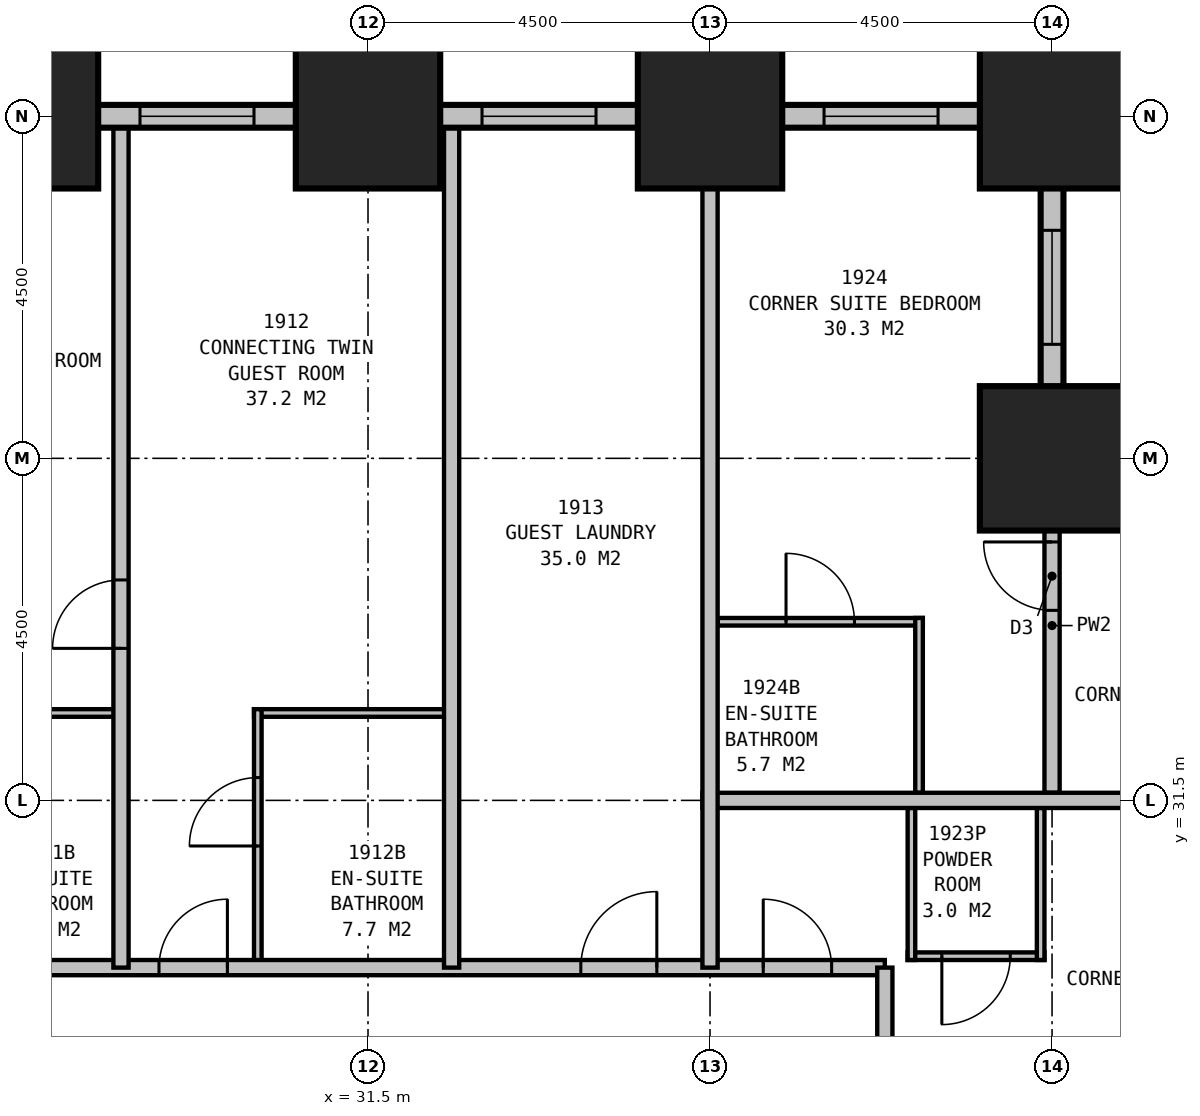
"""IFC4 building model, lengths in metres.
Left out: names, types, materials, properties, quantities, classifications, styles, units other than length and angle.
Written with IfcOpenShell. Run it as: python <this file> out.ifc"""

import sys

from ifc_helpers import new_model, si_unit, direction, frame, frame_2d, origin, origin_2d, place, context, subcontext, project, spatial, rectangle, extrude, element, fill, save


model = new_model("IFC4")
c1 = context("Model", 3, precision=1e-05, world=origin(), true_north=direction((0.0, 1.0)))
c2 = subcontext(c1, "Body", "Model", "MODEL_VIEW")
j1 = project(units=[si_unit("LENGTHUNIT", "METRE"), si_unit("PLANEANGLEUNIT", "RADIAN")], contexts=[c1])
p1 = place(None, origin())
s1 = spatial("IfcSite", under=j1, at=p1, CompositionType="ELEMENT")
p2 = place(p1, origin())
s2 = spatial("IfcBuilding", under=s1, at=p2, CompositionType="ELEMENT")
p3 = place(p2, frame((0.0, 0.0, 78.7)))
s3 = spatial("IfcBuildingStorey", under=s2, at=p3, CompositionType="ELEMENT", Elevation=78.7)
for number, where, z_axis, x_axis in (
    (1, (40.5, 36.0, 0.0), (0.0, 0.0, 1.0), (1.0, 0.0, 0.0)),
    (2, (40.5, 40.5, 0.0), (0.0, 0.0, 1.0), (1.0, 0.0, 0.0)),
    (3, (36.0, 40.5, 0.0), (0.0, 0.0, 1.0), (1.0, 0.0, 0.0)),
    (4, (31.5, 40.5, 0.0), (0.0, 0.0, 1.0), (1.0, 0.0, 0.0)),
    (5, (27.0, 40.5, 0.0), (0.0, 0.0, 1.0), (1.0, 0.0, 0.0)),
):
    element("IfcColumn", number, at=place(p3, frame(where, z_axis=z_axis, x_axis=x_axis)), inside=s3, PredefinedType="COLUMN", context=c2, shape_type="SweptSolid", body=[
        extrude(rectangle(XDim=1.9, YDim=1.9, at=origin_2d()), origin(), (0.0, 0.0, 1.0), 3.5),
    ])
p4 = place(p3, frame((45.65, 36.0, 0.0), z_axis=(0.0, 0.0, 1.0), x_axis=(-1.0, 0.0, 0.0)))
e6 = element("IfcWall", 6, at=p4, inside=s3, PredefinedType="STANDARD", context=c2, shape_type="SweptSolid", body=[
    extrude(rectangle(XDim=5.3, YDim=0.3, at=frame_2d((2.65, 0.0))), origin(), (0.0, 0.0, 1.0), 2.05),
])
p5 = place(p4, frame((1.45, 0.0, 0.5)))
e7 = element("IfcOpeningElement", 7, at=p5, cuts=e6, PredefinedType="OPENING", context=c2, shape_type="SweptSolid", body=[
    extrude(rectangle(XDim=2.4, YDim=1.4, at=frame_2d((1.2, 0.7))), frame((0.0, 0.16, 0.0), z_axis=(0.0, -1.0, 0.0), x_axis=(1.0, 0.0, 0.0)), (0.0, 0.0, 1.0), 0.32),
])
p6 = place(p3, frame((40.5, 35.85, 0.0), z_axis=(0.0, 0.0, 1.0), x_axis=(0.0, 1.0, 0.0)))
e8 = element("IfcWall", 8, at=p6, inside=s3, PredefinedType="STANDARD", context=c2, shape_type="SweptSolid", body=[
    extrude(rectangle(XDim=4.8, YDim=0.3, at=frame_2d((2.4, 0.0))), origin(), (0.0, 0.0, 1.0), 2.05),
])
p7 = place(p6, frame((1.65, 0.0, 0.5)))
e9 = element("IfcOpeningElement", 9, at=p7, cuts=e8, PredefinedType="OPENING", context=c2, shape_type="SweptSolid", body=[
    extrude(rectangle(XDim=1.5, YDim=1.4, at=frame_2d((0.75, 0.7))), frame((0.0, 0.16, 0.0), z_axis=(0.0, -1.0, 0.0), x_axis=(1.0, 0.0, 0.0)), (0.0, 0.0, 1.0), 0.32),
])
p8 = place(p3, frame((40.65, 40.5, 0.0), z_axis=(0.0, 0.0, 1.0), x_axis=(-1.0, 0.0, 0.0)))
e10 = element("IfcWall", 10, at=p8, inside=s3, PredefinedType="STANDARD", context=c2, shape_type="SweptSolid", body=[
    extrude(rectangle(XDim=31.8, YDim=0.3, at=frame_2d((15.9, 0.0))), origin(), (0.0, 0.0, 1.0), 2.05),
])
p9 = place(p8, frame((1.65, 0.0, 0.5)))
e11 = element("IfcOpeningElement", 11, at=p9, cuts=e10, PredefinedType="OPENING", context=c2, shape_type="SweptSolid", body=[
    extrude(rectangle(XDim=1.5, YDim=1.4, at=frame_2d((0.75, 0.7))), frame((0.0, 0.16, 0.0), z_axis=(0.0, -1.0, 0.0), x_axis=(1.0, 0.0, 0.0)), (0.0, 0.0, 1.0), 0.32),
])
p10 = place(p8, frame((6.15, 0.0, 0.5)))
e12 = element("IfcOpeningElement", 12, at=p10, cuts=e10, PredefinedType="OPENING", context=c2, shape_type="SweptSolid", body=[
    extrude(rectangle(XDim=1.5, YDim=1.4, at=frame_2d((0.75, 0.7))), frame((0.0, 0.16, 0.0), z_axis=(0.0, -1.0, 0.0), x_axis=(1.0, 0.0, 0.0)), (0.0, 0.0, 1.0), 0.32),
])
p11 = place(p8, frame((10.65, 0.0, 0.5)))
e13 = element("IfcOpeningElement", 13, at=p11, cuts=e10, PredefinedType="OPENING", context=c2, shape_type="SweptSolid", body=[
    extrude(rectangle(XDim=1.5, YDim=1.4, at=frame_2d((0.75, 0.7))), frame((0.0, 0.16, 0.0), z_axis=(0.0, -1.0, 0.0), x_axis=(1.0, 0.0, 0.0)), (0.0, 0.0, 1.0), 0.32),
])
p12 = place(p8, frame((15.15, 0.0, 0.5)))
e14 = element("IfcOpeningElement", 14, at=p12, cuts=e10, PredefinedType="OPENING", context=c2, shape_type="SweptSolid", body=[
    extrude(rectangle(XDim=1.5, YDim=1.4, at=frame_2d((0.75, 0.7))), frame((0.0, 0.16, 0.0), z_axis=(0.0, -1.0, 0.0), x_axis=(1.0, 0.0, 0.0)), (0.0, 0.0, 1.0), 0.32),
])
p13 = place(p8, frame((19.65, 0.0, 0.5)))
e15 = element("IfcOpeningElement", 15, at=p13, cuts=e10, PredefinedType="OPENING", context=c2, shape_type="SweptSolid", body=[
    extrude(rectangle(XDim=1.5, YDim=1.4, at=frame_2d((0.75, 0.7))), frame((0.0, 0.16, 0.0), z_axis=(0.0, -1.0, 0.0), x_axis=(1.0, 0.0, 0.0)), (0.0, 0.0, 1.0), 0.32),
])
p14 = place(p8, frame((24.15, 0.0, 0.5)))
e16 = element("IfcOpeningElement", 16, at=p14, cuts=e10, PredefinedType="OPENING", context=c2, shape_type="SweptSolid", body=[
    extrude(rectangle(XDim=1.5, YDim=1.4, at=frame_2d((0.75, 0.7))), frame((0.0, 0.16, 0.0), z_axis=(0.0, -1.0, 0.0), x_axis=(1.0, 0.0, 0.0)), (0.0, 0.0, 1.0), 0.32),
])
p15 = place(p8, frame((28.65, 0.0, 0.5)))
e17 = element("IfcOpeningElement", 17, at=p15, cuts=e10, PredefinedType="OPENING", context=c2, shape_type="SweptSolid", body=[
    extrude(rectangle(XDim=1.5, YDim=1.4, at=frame_2d((0.75, 0.7))), frame((0.0, 0.16, 0.0), z_axis=(0.0, -1.0, 0.0), x_axis=(1.0, 0.0, 0.0)), (0.0, 0.0, 1.0), 0.32),
])
p16 = place(p3, frame((11.2, 29.3, 0.0), z_axis=(0.0, 0.0, 1.0), x_axis=(1.0, 0.0, 0.0)))
e18 = element("IfcWall", 18, at=p16, inside=s3, PredefinedType="PARTITIONING", context=c2, shape_type="SweptSolid", body=[
    extrude(rectangle(XDim=27.1, YDim=0.2, at=frame_2d((13.55, 0.0))), origin(), (0.0, 0.0, 1.0), 3.25),
])
p17 = place(p16, frame((4.2, 0.0, 0.0)))
e19 = element("IfcOpeningElement", 19, at=p17, cuts=e18, PredefinedType="OPENING", context=c2, shape_type="SweptSolid", body=[
    extrude(rectangle(XDim=0.9, YDim=2.1, at=frame_2d((0.45, 1.05))), frame((0.0, 0.11, 0.0), z_axis=(0.0, -1.0, 0.0), x_axis=(1.0, 0.0, 0.0)), (0.0, 0.0, 1.0), 0.22),
])
p18 = place(p16, frame((8.7, 0.0, 0.0)))
e20 = element("IfcOpeningElement", 20, at=p18, cuts=e18, PredefinedType="OPENING", context=c2, shape_type="SweptSolid", body=[
    extrude(rectangle(XDim=0.9, YDim=2.1, at=frame_2d((0.45, 1.05))), frame((0.0, 0.11, 0.0), z_axis=(0.0, -1.0, 0.0), x_axis=(1.0, 0.0, 0.0)), (0.0, 0.0, 1.0), 0.22),
])
p19 = place(p16, frame((13.2, 0.0, 0.0)))
e21 = element("IfcOpeningElement", 21, at=p19, cuts=e18, PredefinedType="OPENING", context=c2, shape_type="SweptSolid", body=[
    extrude(rectangle(XDim=0.9, YDim=2.1, at=frame_2d((0.45, 1.05))), frame((0.0, 0.11, 0.0), z_axis=(0.0, -1.0, 0.0), x_axis=(1.0, 0.0, 0.0)), (0.0, 0.0, 1.0), 0.22),
])
p20 = place(p16, frame((17.55, 0.0, 0.0)))
e22 = element("IfcOpeningElement", 22, at=p20, cuts=e18, PredefinedType="OPENING", context=c2, shape_type="SweptSolid", body=[
    extrude(rectangle(XDim=0.9, YDim=2.1, at=frame_2d((0.45, 1.05))), frame((0.0, 0.11, 0.0), z_axis=(0.0, -1.0, 0.0), x_axis=(1.0, 0.0, 0.0)), (0.0, 0.0, 1.0), 0.22),
])
p21 = place(p16, frame((23.1, 0.0, 0.0)))
e23 = element("IfcOpeningElement", 23, at=p21, cuts=e18, PredefinedType="OPENING", context=c2, shape_type="SweptSolid", body=[
    extrude(rectangle(XDim=1.0, YDim=2.1, at=frame_2d((0.5, 1.05))), frame((0.0, 0.11, 0.0), z_axis=(0.0, -1.0, 0.0), x_axis=(1.0, 0.0, 0.0)), (0.0, 0.0, 1.0), 0.22),
])
p22 = place(p16, frame((25.5, 0.0, 0.0)))
e24 = element("IfcOpeningElement", 24, at=p22, cuts=e18, PredefinedType="OPENING", context=c2, shape_type="SweptSolid", body=[
    extrude(rectangle(XDim=0.9, YDim=2.1, at=frame_2d((0.45, 1.05))), frame((0.0, 0.11, 0.0), z_axis=(0.0, -1.0, 0.0), x_axis=(1.0, 0.0, 0.0)), (0.0, 0.0, 1.0), 0.22),
])
p23 = place(p16, frame((0.7, 0.0, 0.0)))
e25 = element("IfcOpeningElement", 25, at=p23, cuts=e18, PredefinedType="OPENING", context=c2, shape_type="SweptSolid", body=[
    extrude(rectangle(XDim=0.9, YDim=2.1, at=frame_2d((0.45, 1.05))), frame((0.0, 0.11, 0.0), z_axis=(0.0, -1.0, 0.0), x_axis=(1.0, 0.0, 0.0)), (0.0, 0.0, 1.0), 0.22),
])
p24 = place(p3, frame((38.3, 10.6, 0.0), z_axis=(0.0, 0.0, 1.0), x_axis=(0.0, 1.0, 0.0)))
e26 = element("IfcWall", 26, at=p24, inside=s3, PredefinedType="PARTITIONING", context=c2, shape_type="SweptSolid", body=[
    extrude(rectangle(XDim=18.7, YDim=0.2, at=frame_2d((9.35, 0.0))), origin(), (0.0, 0.0, 1.0), 3.25),
])
p25 = place(p24, frame((6.75, 0.0, 0.0), z_axis=(0.0, 0.0, 1.0), x_axis=(-1.0, 0.0, 0.0)))
e27 = element("IfcOpeningElement", 27, at=p25, cuts=e26, PredefinedType="OPENING", context=c2, shape_type="SweptSolid", body=[
    extrude(rectangle(XDim=0.9, YDim=2.1, at=frame_2d((0.45, 1.05))), frame((0.0, 0.11, 0.0), z_axis=(0.0, -1.0, 0.0), x_axis=(1.0, 0.0, 0.0)), (0.0, 0.0, 1.0), 0.22),
])
p26 = place(p24, frame((9.85, 0.0, 0.0), z_axis=(0.0, 0.0, 1.0), x_axis=(-1.0, 0.0, 0.0)))
e28 = element("IfcOpeningElement", 28, at=p26, cuts=e26, PredefinedType="OPENING", context=c2, shape_type="SweptSolid", body=[
    extrude(rectangle(XDim=1.0, YDim=2.1, at=frame_2d((0.5, 1.05))), frame((0.0, 0.11, 0.0), z_axis=(0.0, -1.0, 0.0), x_axis=(1.0, 0.0, 0.0)), (0.0, 0.0, 1.0), 0.22),
])
p27 = place(p24, frame((15.65, 0.0, 0.0), z_axis=(0.0, 0.0, 1.0), x_axis=(-1.0, 0.0, 0.0)))
e29 = element("IfcOpeningElement", 29, at=p27, cuts=e26, PredefinedType="OPENING", context=c2, shape_type="SweptSolid", body=[
    extrude(rectangle(XDim=1.0, YDim=2.1, at=frame_2d((0.5, 1.05))), frame((0.0, 0.11, 0.0), z_axis=(0.0, -1.0, 0.0), x_axis=(1.0, 0.0, 0.0)), (0.0, 0.0, 1.0), 0.22),
])
p28 = place(p3, frame((28.25, 29.3, 0.0), z_axis=(0.0, 0.0, 1.0), x_axis=(0.0, 1.0, 0.0)))
e30 = element("IfcWall", 30, at=p28, inside=s3, PredefinedType="PARTITIONING", context=c2, shape_type="SweptSolid", body=[
    extrude(rectangle(XDim=11.2, YDim=0.2, at=frame_2d((5.6, 0.0))), origin(), (0.0, 0.0, 1.0), 3.25),
])
p29 = place(p28, frame((4.2, 0.0, 0.0)))
e31 = element("IfcOpeningElement", 31, at=p29, cuts=e30, PredefinedType="OPENING", context=c2, shape_type="SweptSolid", body=[
    extrude(rectangle(XDim=0.9, YDim=2.1, at=frame_2d((0.45, 1.05))), frame((0.0, 0.11, 0.0), z_axis=(0.0, -1.0, 0.0), x_axis=(1.0, 0.0, 0.0)), (0.0, 0.0, 1.0), 0.22),
])
p30 = place(p3, frame((32.6, 29.3, 0.0), z_axis=(0.0, 0.0, 1.0), x_axis=(0.0, 1.0, 0.0)))
e32 = element("IfcWall", 32, at=p30, inside=s3, PredefinedType="PARTITIONING", context=c2, shape_type="SweptSolid", body=[
    extrude(rectangle(XDim=11.2, YDim=0.2, at=frame_2d((5.6, 0.0))), origin(), (0.0, 0.0, 1.0), 3.25),
])
for number, where, z_axis, x_axis in (
    (33, (25.65, 32.65, 0.0), (0.0, 0.0, 1.0), (1.0, 0.0, 0.0)),
    (34, (30.0, 32.65, 0.0), (0.0, 0.0, 1.0), (1.0, 0.0, 0.0)),
):
    element("IfcWall", number, at=place(p3, frame(where, z_axis=z_axis, x_axis=x_axis)), inside=s3, PredefinedType="PLUMBINGWALL", context=c2, shape_type="SweptSolid", body=[
        extrude(rectangle(XDim=2.6, YDim=0.1, at=frame_2d((1.3, 0.0))), origin(), (0.0, 0.0, 1.0), 3.25),
    ])
p31 = place(p3, frame((30.05, 29.3, 0.0), z_axis=(0.0, 0.0, 1.0), x_axis=(0.0, 1.0, 0.0)))
e35 = element("IfcWall", 35, at=p31, inside=s3, PredefinedType="PLUMBINGWALL", context=c2, shape_type="SweptSolid", body=[
    extrude(rectangle(XDim=3.4, YDim=0.1, at=frame_2d((1.7, 0.0))), origin(), (0.0, 0.0, 1.0), 3.25),
])
p32 = place(p31, frame((1.6, 0.0, 0.0)))
e36 = element("IfcOpeningElement", 36, at=p32, cuts=e35, PredefinedType="OPENING", context=c2, shape_type="SweptSolid", body=[
    extrude(rectangle(XDim=0.9, YDim=2.1, at=frame_2d((0.45, 1.05))), frame((0.0, 0.06, 0.0), z_axis=(0.0, -1.0, 0.0), x_axis=(1.0, 0.0, 0.0)), (0.0, 0.0, 1.0), 0.12),
])
p33 = place(p3, frame((36.0, 29.3, 0.0), z_axis=(0.0, 0.0, 1.0), x_axis=(0.0, 1.0, 0.0)))
e37 = element("IfcWall", 37, at=p33, inside=s3, PredefinedType="PARTITIONING", context=c2, shape_type="SweptSolid", body=[
    extrude(rectangle(XDim=11.2, YDim=0.2, at=frame_2d((5.6, 0.0))), origin(), (0.0, 0.0, 1.0), 2.25),
])
p34 = place(p3, frame((35.9, 31.5, 0.0), z_axis=(0.0, 0.0, 1.0), x_axis=(1.0, 0.0, 0.0)))
e38 = element("IfcWall", 38, at=p34, inside=s3, PredefinedType="PARTITIONING", context=c2, shape_type="SweptSolid", body=[
    extrude(rectangle(XDim=10.099, YDim=0.2, at=frame_2d((5.05, 0.0))), origin(), (0.0, 0.0, 1.0), 3.25),
])
p35 = place(p34, frame((8.099, 0.0, 0.0)))
e39 = element("IfcOpeningElement", 39, at=p35, cuts=e38, PredefinedType="OPENING", context=c2, shape_type="SweptSolid", body=[
    extrude(rectangle(XDim=0.9, YDim=2.1, at=frame_2d((0.45, 1.05))), frame((0.0, 0.11, 0.0), z_axis=(0.0, -1.0, 0.0), x_axis=(1.0, 0.0, 0.0)), (0.0, 0.0, 1.0), 0.22),
])
p36 = place(p3, frame((40.35, 31.4, 0.0), z_axis=(0.0, 0.0, 1.0), x_axis=(0.0, -1.0, 0.0)))
e40 = element("IfcWall", 40, at=p36, inside=s3, PredefinedType="PLUMBINGWALL", context=c2, shape_type="SweptSolid", body=[
    extrude(rectangle(XDim=2.0, YDim=0.1, at=frame_2d((1.0, 0.0))), origin(), (0.0, 0.0, 1.0), 2.25),
])
p37 = place(p3, frame((38.65, 31.4, 0.0), z_axis=(0.0, 0.0, 1.0), x_axis=(0.0, -1.0, 0.0)))
e41 = element("IfcWall", 41, at=p37, inside=s3, PredefinedType="PLUMBINGWALL", context=c2, shape_type="SweptSolid", body=[
    extrude(rectangle(XDim=2.0, YDim=0.1, at=frame_2d((1.0, 0.0))), origin(), (0.0, 0.0, 1.0), 3.25),
])
p38 = place(p3, frame((38.6, 29.45, 0.0), z_axis=(0.0, 0.0, 1.0), x_axis=(1.0, 0.0, 0.0)))
e42 = element("IfcWall", 42, at=p38, inside=s3, PredefinedType="PLUMBINGWALL", context=c2, shape_type="SweptSolid", body=[
    extrude(rectangle(XDim=1.8, YDim=0.1, at=frame_2d((0.9, 0.0))), origin(), (0.0, 0.0, 1.0), 3.25),
])
p39 = place(p38, frame((1.35, 0.0, 0.0), z_axis=(0.0, 0.0, 1.0), x_axis=(-1.0, 0.0, 0.0)))
e43 = element("IfcOpeningElement", 43, at=p39, cuts=e42, PredefinedType="OPENING", context=c2, shape_type="SweptSolid", body=[
    extrude(rectangle(XDim=0.9, YDim=2.1, at=frame_2d((0.45, 1.05))), frame((0.0, 0.06, 0.0), z_axis=(0.0, -1.0, 0.0), x_axis=(1.0, 0.0, 0.0)), (0.0, 0.0, 1.0), 0.12),
])
p40 = place(p3, frame((40.5, 31.6, 0.0), z_axis=(0.0, 0.0, 1.0), x_axis=(0.0, 1.0, 0.0)))
e44 = element("IfcWall", 44, at=p40, inside=s3, PredefinedType="PARTITIONING", context=c2, shape_type="SweptSolid", body=[
    extrude(rectangle(XDim=4.4, YDim=0.2, at=frame_2d((2.2, 0.0))), origin(), (0.0, 0.0, 1.0), 2.25),
])
p41 = place(p40, frame((2.4, 0.0, 0.0)))
e45 = element("IfcOpeningElement", 45, at=p41, cuts=e44, PredefinedType="OPENING", context=c2, shape_type="SweptSolid", body=[
    extrude(rectangle(XDim=0.9, YDim=2.1, at=frame_2d((0.45, 1.05))), frame((0.0, 0.11, 0.0), z_axis=(0.0, -1.0, 0.0), x_axis=(1.0, 0.0, 0.0)), (0.0, 0.0, 1.0), 0.22),
])
p42 = place(p3, frame((38.75, 31.6, 0.0), z_axis=(0.0, 0.0, 1.0), x_axis=(0.0, 1.0, 0.0)))
e46 = element("IfcWall", 46, at=p42, inside=s3, PredefinedType="PLUMBINGWALL", context=c2, shape_type="SweptSolid", body=[
    extrude(rectangle(XDim=2.3, YDim=0.1, at=frame_2d((1.15, 0.0))), origin(), (0.0, 0.0, 1.0), 3.25),
])
p43 = place(p3, frame((36.1, 33.85, 0.0), z_axis=(0.0, 0.0, 1.0), x_axis=(1.0, 0.0, 0.0)))
e47 = element("IfcWall", 47, at=p43, inside=s3, PredefinedType="PLUMBINGWALL", context=c2, shape_type="SweptSolid", body=[
    extrude(rectangle(XDim=2.7, YDim=0.1, at=frame_2d((1.35, 0.0))), origin(), (0.0, 0.0, 1.0), 3.25),
])
p44 = place(p43, frame((0.9, 0.0, 0.0)))
e48 = element("IfcOpeningElement", 48, at=p44, cuts=e47, PredefinedType="OPENING", context=c2, shape_type="SweptSolid", body=[
    extrude(rectangle(XDim=0.9, YDim=2.1, at=frame_2d((0.45, 1.05))), frame((0.0, 0.06, 0.0), z_axis=(0.0, -1.0, 0.0), x_axis=(1.0, 0.0, 0.0)), (0.0, 0.0, 1.0), 0.12),
])
p45 = place(p7, origin())
e49 = element("IfcWindow", 49, at=p45, inside=s3, PartitioningType="SINGLE_PANEL", PredefinedType="WINDOW", context=c2, shape_type="SweptSolid", body=[
    extrude(rectangle(XDim=1.5, YDim=1.4, at=frame_2d((0.75, 0.7))), frame((0.0, 0.03, 0.0), z_axis=(0.0, -1.0, 0.0), x_axis=(1.0, 0.0, 0.0)), (0.0, 0.0, 1.0), 0.06),
])
fill(e9, e49)
p46 = place(p9, origin())
e50 = element("IfcWindow", 50, at=p46, inside=s3, PartitioningType="SINGLE_PANEL", PredefinedType="WINDOW", context=c2, shape_type="SweptSolid", body=[
    extrude(rectangle(XDim=1.5, YDim=1.4, at=frame_2d((0.75, 0.7))), frame((0.0, 0.03, 0.0), z_axis=(0.0, -1.0, 0.0), x_axis=(1.0, 0.0, 0.0)), (0.0, 0.0, 1.0), 0.06),
])
fill(e11, e50)
p47 = place(p10, origin())
e51 = element("IfcWindow", 51, at=p47, inside=s3, PartitioningType="SINGLE_PANEL", PredefinedType="WINDOW", context=c2, shape_type="SweptSolid", body=[
    extrude(rectangle(XDim=1.5, YDim=1.4, at=frame_2d((0.75, 0.7))), frame((0.0, 0.03, 0.0), z_axis=(0.0, -1.0, 0.0), x_axis=(1.0, 0.0, 0.0)), (0.0, 0.0, 1.0), 0.06),
])
fill(e12, e51)
p48 = place(p11, origin())
e52 = element("IfcWindow", 52, at=p48, inside=s3, PartitioningType="SINGLE_PANEL", PredefinedType="WINDOW", context=c2, shape_type="SweptSolid", body=[
    extrude(rectangle(XDim=1.5, YDim=1.4, at=frame_2d((0.75, 0.7))), frame((0.0, 0.03, 0.0), z_axis=(0.0, -1.0, 0.0), x_axis=(1.0, 0.0, 0.0)), (0.0, 0.0, 1.0), 0.06),
])
fill(e13, e52)
p49 = place(p20, origin())
e53 = element("IfcDoor", 53, at=p49, inside=s3, OperationType="SINGLE_SWING_RIGHT", PredefinedType="DOOR", context=c2, shape_type="SweptSolid", body=[
    extrude(rectangle(XDim=0.9, YDim=2.1, at=frame_2d((0.45, 1.05))), frame((0.0, 0.025, 0.0), z_axis=(0.0, -1.0, 0.0), x_axis=(1.0, 0.0, 0.0)), (0.0, 0.0, 1.0), 0.05),
])
fill(e22, e53)
p50 = place(p21, origin())
e54 = element("IfcDoor", 54, at=p50, inside=s3, OperationType="SINGLE_SWING_RIGHT", PredefinedType="DOOR", context=c2, shape_type="SweptSolid", body=[
    extrude(rectangle(XDim=1.0, YDim=2.1, at=frame_2d((0.5, 1.05))), frame((0.0, 0.025, 0.0), z_axis=(0.0, -1.0, 0.0), x_axis=(1.0, 0.0, 0.0)), (0.0, 0.0, 1.0), 0.05),
])
fill(e23, e54)
p51 = place(p22, origin())
e55 = element("IfcDoor", 55, at=p51, inside=s3, OperationType="SINGLE_SWING_LEFT", PredefinedType="DOOR", context=c2, shape_type="SweptSolid", body=[
    extrude(rectangle(XDim=0.9, YDim=2.1, at=frame_2d((0.45, 1.05))), frame((0.0, 0.025, 0.0), z_axis=(0.0, -1.0, 0.0), x_axis=(1.0, 0.0, 0.0)), (0.0, 0.0, 1.0), 0.05),
])
fill(e24, e55)
p52 = place(p29, origin())
e56 = element("IfcDoor", 56, at=p52, inside=s3, OperationType="SINGLE_SWING_LEFT", PredefinedType="DOOR", context=c2, shape_type="SweptSolid", body=[
    extrude(rectangle(XDim=0.9, YDim=2.1, at=frame_2d((0.45, 1.05))), frame((0.0, 0.025, 0.0), z_axis=(0.0, -1.0, 0.0), x_axis=(1.0, 0.0, 0.0)), (0.0, 0.0, 1.0), 0.05),
])
fill(e31, e56)
p53 = place(p32, origin())
e57 = element("IfcDoor", 57, at=p53, inside=s3, OperationType="SINGLE_SWING_LEFT", PredefinedType="DOOR", context=c2, shape_type="SweptSolid", body=[
    extrude(rectangle(XDim=0.9, YDim=2.1, at=frame_2d((0.45, 1.05))), frame((0.0, 0.025, 0.0), z_axis=(0.0, -1.0, 0.0), x_axis=(1.0, 0.0, 0.0)), (0.0, 0.0, 1.0), 0.05),
])
fill(e36, e57)
p54 = place(p39, origin())
e58 = element("IfcDoor", 58, at=p54, inside=s3, OperationType="SINGLE_SWING_RIGHT", PredefinedType="DOOR", context=c2, shape_type="SweptSolid", body=[
    extrude(rectangle(XDim=0.9, YDim=2.1, at=frame_2d((0.45, 1.05))), frame((0.0, 0.025, 0.0), z_axis=(0.0, -1.0, 0.0), x_axis=(1.0, 0.0, 0.0)), (0.0, 0.0, 1.0), 0.05),
])
fill(e43, e58)
p55 = place(p41, origin())
e59 = element("IfcDoor", 59, at=p55, inside=s3, OperationType="SINGLE_SWING_RIGHT", PredefinedType="DOOR", context=c2, shape_type="SweptSolid", body=[
    extrude(rectangle(XDim=0.9, YDim=2.1, at=frame_2d((0.45, 1.05))), frame((0.0, 0.025, 0.0), z_axis=(0.0, -1.0, 0.0), x_axis=(1.0, 0.0, 0.0)), (0.0, 0.0, 1.0), 0.05),
])
fill(e45, e59)
p56 = place(p44, origin())
e60 = element("IfcDoor", 60, at=p56, inside=s3, OperationType="SINGLE_SWING_LEFT", PredefinedType="DOOR", context=c2, shape_type="SweptSolid", body=[
    extrude(rectangle(XDim=0.9, YDim=2.1, at=frame_2d((0.45, 1.05))), frame((0.0, 0.025, 0.0), z_axis=(0.0, -1.0, 0.0), x_axis=(1.0, 0.0, 0.0)), (0.0, 0.0, 1.0), 0.05),
])
fill(e48, e60)
save(model, sys.argv[1])
